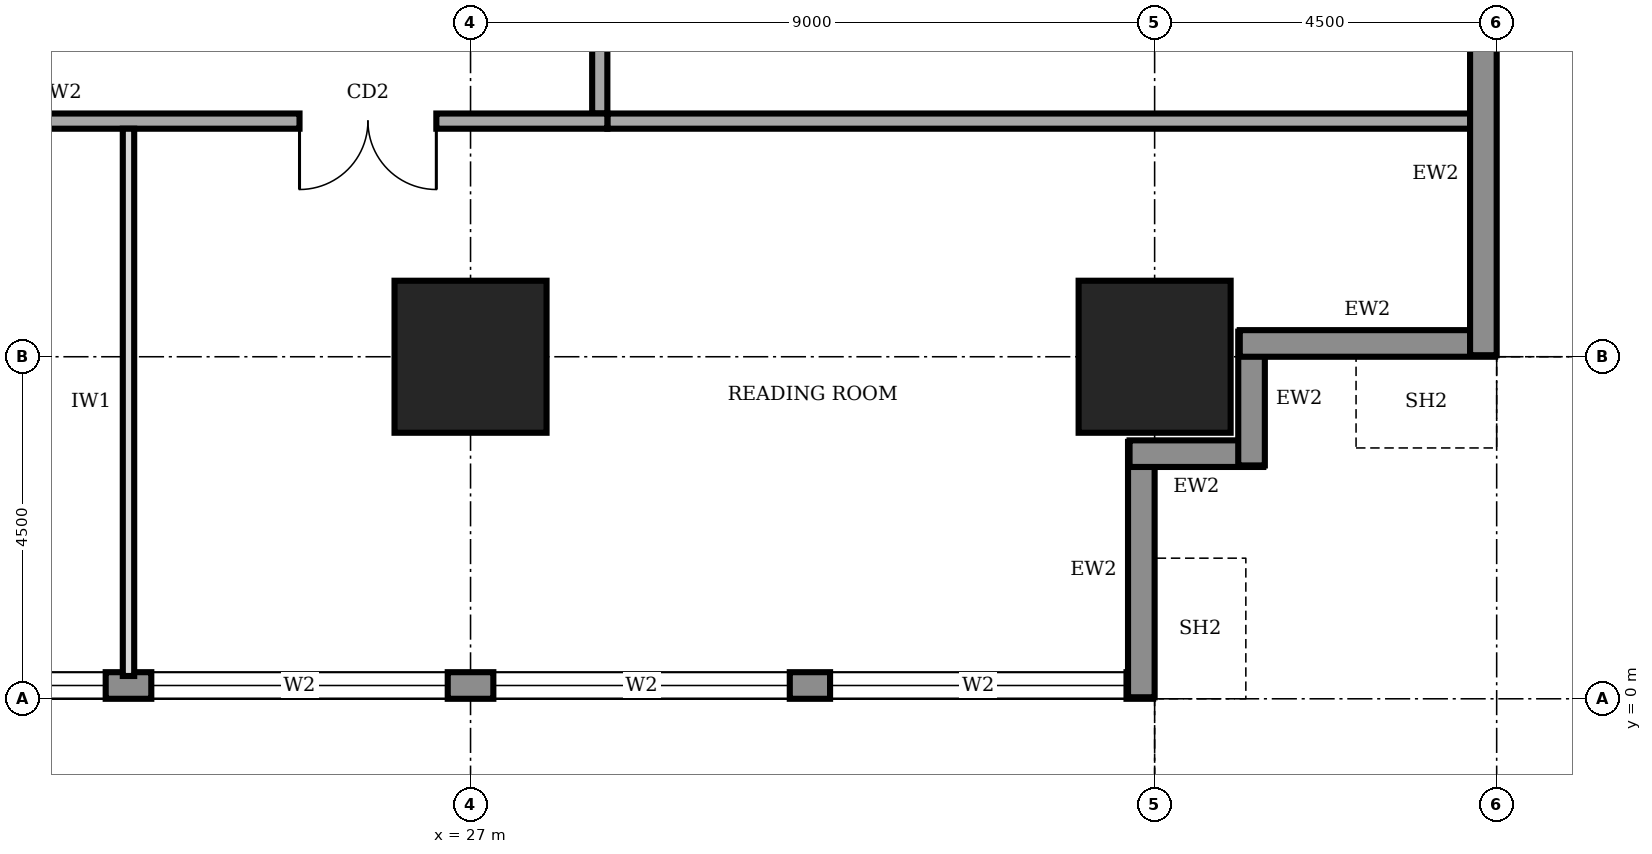
"""IFC4 building model, lengths in metres.
Left out: names, types, materials, properties, quantities, classifications, styles, units other than length and angle.
Written with IfcOpenShell. Run it as: python <this file> out.ifc"""

import sys

from ifc_helpers import new_model, si_unit, direction, frame, frame_2d, origin, origin_2d, place, context, subcontext, project, spatial, rectangle, extrude, element, fill, save


model = new_model("IFC4")
c1 = context("Model", 3, precision=1e-05, world=origin(), true_north=direction((0.0, 1.0)))
c2 = subcontext(c1, "Body", "Model", "MODEL_VIEW")
j1 = project(units=[si_unit("LENGTHUNIT", "METRE"), si_unit("PLANEANGLEUNIT", "RADIAN")], contexts=[c1])
p1 = place(None, origin())
s1 = spatial("IfcSite", under=j1, at=p1, CompositionType="ELEMENT")
p2 = place(p1, origin())
s2 = spatial("IfcBuilding", under=s1, at=p2, CompositionType="ELEMENT")
p3 = place(p2, frame((0.0, 0.0, 73.0)))
s3 = spatial("IfcBuildingStorey", under=s2, at=p3, CompositionType="ELEMENT", Elevation=73.0)
for number, where, z_axis, x_axis in (
    (1, (27.0, 4.5, 0.0), (0.0, 0.0, 1.0), (1.0, 0.0, 0.0)),
    (2, (36.0, 4.5, 0.0), (0.0, 0.0, 1.0), (1.0, 0.0, 0.0)),
):
    element("IfcColumn", number, at=place(p3, frame(where, z_axis=z_axis, x_axis=x_axis)), inside=s3, PredefinedType="COLUMN", context=c2, shape_type="SweptSolid", body=[
        extrude(rectangle(XDim=2.0, YDim=2.0, at=origin_2d()), origin(), (0.0, 0.0, 1.0), 4.0),
    ])
p4 = place(p3, frame((4.52, 0.175, 0.0), z_axis=(0.0, 0.0, 1.0), x_axis=(1.0, 0.0, 0.0)))
e3 = element("IfcWall", 3, at=p4, inside=s3, PredefinedType="STANDARD", context=c2, shape_type="SweptSolid", body=[
    extrude(rectangle(XDim=31.46, YDim=0.35, at=frame_2d((15.73, 0.0))), origin(), (0.0, 0.0, 1.0), 3.75),
])
p5 = place(p4, frame((4.78, 0.0, 0.6)))
e4 = element("IfcOpeningElement", 4, at=p5, cuts=e3, PredefinedType="OPENING", context=c2, shape_type="SweptSolid", body=[
    extrude(rectangle(XDim=3.9, YDim=2.6, at=frame_2d((1.95, 1.3))), frame((0.0, 0.185, 0.0), z_axis=(0.0, -1.0, 0.0), x_axis=(1.0, 0.0, 0.0)), (0.0, 0.0, 1.0), 0.37),
])
p6 = place(p4, frame((9.28, 0.0, 0.6)))
e5 = element("IfcOpeningElement", 5, at=p6, cuts=e3, PredefinedType="OPENING", context=c2, shape_type="SweptSolid", body=[
    extrude(rectangle(XDim=3.9, YDim=2.6, at=frame_2d((1.95, 1.3))), frame((0.0, 0.185, 0.0), z_axis=(0.0, -1.0, 0.0), x_axis=(1.0, 0.0, 0.0)), (0.0, 0.0, 1.0), 0.37),
])
p7 = place(p4, frame((13.78, 0.0, 0.6)))
e6 = element("IfcOpeningElement", 6, at=p7, cuts=e3, PredefinedType="OPENING", context=c2, shape_type="SweptSolid", body=[
    extrude(rectangle(XDim=3.9, YDim=2.6, at=frame_2d((1.95, 1.3))), frame((0.0, 0.185, 0.0), z_axis=(0.0, -1.0, 0.0), x_axis=(1.0, 0.0, 0.0)), (0.0, 0.0, 1.0), 0.37),
])
p8 = place(p4, frame((18.28, 0.0, 0.6)))
e7 = element("IfcOpeningElement", 7, at=p8, cuts=e3, PredefinedType="OPENING", context=c2, shape_type="SweptSolid", body=[
    extrude(rectangle(XDim=3.9, YDim=2.6, at=frame_2d((1.95, 1.3))), frame((0.0, 0.185, 0.0), z_axis=(0.0, -1.0, 0.0), x_axis=(1.0, 0.0, 0.0)), (0.0, 0.0, 1.0), 0.37),
])
p9 = place(p4, frame((22.78, 0.0, 0.6)))
e8 = element("IfcOpeningElement", 8, at=p9, cuts=e3, PredefinedType="OPENING", context=c2, shape_type="SweptSolid", body=[
    extrude(rectangle(XDim=3.9, YDim=2.6, at=frame_2d((1.95, 1.3))), frame((0.0, 0.185, 0.0), z_axis=(0.0, -1.0, 0.0), x_axis=(1.0, 0.0, 0.0)), (0.0, 0.0, 1.0), 0.37),
])
p10 = place(p4, frame((27.21, 0.0, 0.6)))
e9 = element("IfcOpeningElement", 9, at=p10, cuts=e3, PredefinedType="OPENING", context=c2, shape_type="SweptSolid", body=[
    extrude(rectangle(XDim=3.9, YDim=2.6, at=frame_2d((1.95, 1.3))), frame((0.0, 0.185, 0.0), z_axis=(0.0, -1.0, 0.0), x_axis=(1.0, 0.0, 0.0)), (0.0, 0.0, 1.0), 0.37),
])
p11 = place(p3, frame((35.825, 0.02, 0.0), z_axis=(0.0, 0.0, 1.0), x_axis=(0.0, 1.0, 0.0)))
e10 = element("IfcWall", 10, at=p11, inside=s3, PredefinedType="STANDARD", context=c2, shape_type="SweptSolid", body=[
    extrude(rectangle(XDim=3.36, YDim=0.35, at=frame_2d((1.68, 0.0))), origin(), (0.0, 0.0, 1.0), 2.75),
])
for number, where, z_axis, x_axis in (
    (11, (35.67, 3.225, 0.0), (0.0, 0.0, 1.0), (1.0, 0.0, 0.0)),
    (12, (37.275, 3.07, 0.0), (0.0, 0.0, 1.0), (0.0, 1.0, 0.0)),
):
    element("IfcWall", number, at=place(p3, frame(where, z_axis=z_axis, x_axis=x_axis)), inside=s3, PredefinedType="STANDARD", context=c2, shape_type="SweptSolid", body=[
        extrude(rectangle(XDim=1.76, YDim=0.35, at=frame_2d((0.88, 0.0))), origin(), (0.0, 0.0, 1.0), 3.75),
    ])
p12 = place(p3, frame((37.12, 4.675, 0.0), z_axis=(0.0, 0.0, 1.0), x_axis=(1.0, 0.0, 0.0)))
e13 = element("IfcWall", 13, at=p12, inside=s3, PredefinedType="STANDARD", context=c2, shape_type="SweptSolid", body=[
    extrude(rectangle(XDim=3.36, YDim=0.35, at=frame_2d((1.68, 0.0))), origin(), (0.0, 0.0, 1.0), 2.75),
])
p13 = place(p3, frame((40.325, 4.52, 0.0), z_axis=(0.0, 0.0, 1.0), x_axis=(0.0, 1.0, 0.0)))
e14 = element("IfcWall", 14, at=p13, inside=s3, PredefinedType="STANDARD", context=c2, shape_type="SweptSolid", body=[
    extrude(rectangle(XDim=31.46, YDim=0.35, at=frame_2d((15.73, 0.0))), origin(), (0.0, 0.0, 1.0), 3.75),
])
p14 = place(p13, frame((4.78, 0.0, 0.6)))
e15 = element("IfcOpeningElement", 15, at=p14, cuts=e14, PredefinedType="OPENING", context=c2, shape_type="SweptSolid", body=[
    extrude(rectangle(XDim=3.9, YDim=2.6, at=frame_2d((1.95, 1.3))), frame((0.0, 0.185, 0.0), z_axis=(0.0, -1.0, 0.0), x_axis=(1.0, 0.0, 0.0)), (0.0, 0.0, 1.0), 0.37),
])
p15 = place(p13, frame((9.28, 0.0, 0.6)))
e16 = element("IfcOpeningElement", 16, at=p15, cuts=e14, PredefinedType="OPENING", context=c2, shape_type="SweptSolid", body=[
    extrude(rectangle(XDim=3.9, YDim=2.6, at=frame_2d((1.95, 1.3))), frame((0.0, 0.185, 0.0), z_axis=(0.0, -1.0, 0.0), x_axis=(1.0, 0.0, 0.0)), (0.0, 0.0, 1.0), 0.37),
])
p16 = place(p13, frame((13.78, 0.0, 0.6)))
e17 = element("IfcOpeningElement", 17, at=p16, cuts=e14, PredefinedType="OPENING", context=c2, shape_type="SweptSolid", body=[
    extrude(rectangle(XDim=3.9, YDim=2.6, at=frame_2d((1.95, 1.3))), frame((0.0, 0.185, 0.0), z_axis=(0.0, -1.0, 0.0), x_axis=(1.0, 0.0, 0.0)), (0.0, 0.0, 1.0), 0.37),
])
p17 = place(p13, frame((18.28, 0.0, 0.6)))
e18 = element("IfcOpeningElement", 18, at=p17, cuts=e14, PredefinedType="OPENING", context=c2, shape_type="SweptSolid", body=[
    extrude(rectangle(XDim=3.9, YDim=2.6, at=frame_2d((1.95, 1.3))), frame((0.0, 0.185, 0.0), z_axis=(0.0, -1.0, 0.0), x_axis=(1.0, 0.0, 0.0)), (0.0, 0.0, 1.0), 0.37),
])
p18 = place(p13, frame((22.78, 0.0, 0.6)))
e19 = element("IfcOpeningElement", 19, at=p18, cuts=e14, PredefinedType="OPENING", context=c2, shape_type="SweptSolid", body=[
    extrude(rectangle(XDim=3.9, YDim=2.6, at=frame_2d((1.95, 1.3))), frame((0.0, 0.185, 0.0), z_axis=(0.0, -1.0, 0.0), x_axis=(1.0, 0.0, 0.0)), (0.0, 0.0, 1.0), 0.37),
])
p19 = place(p13, frame((27.21, 0.0, 0.6)))
e20 = element("IfcOpeningElement", 20, at=p19, cuts=e14, PredefinedType="OPENING", context=c2, shape_type="SweptSolid", body=[
    extrude(rectangle(XDim=3.9, YDim=2.6, at=frame_2d((1.95, 1.3))), frame((0.0, 0.185, 0.0), z_axis=(0.0, -1.0, 0.0), x_axis=(1.0, 0.0, 0.0)), (0.0, 0.0, 1.0), 0.37),
])
p20 = place(p3, frame((11.9, 7.6, 0.0), z_axis=(0.0, 0.0, 1.0), x_axis=(1.0, 0.0, 0.0)))
e21 = element("IfcWall", 21, at=p20, inside=s3, PredefinedType="SOLIDWALL", context=c2, shape_type="SweptSolid", body=[
    extrude(rectangle(XDim=16.9, YDim=0.2, at=frame_2d((8.45, 0.0))), origin(), (0.0, 0.0, 1.0), 3.75),
])
p21 = place(p20, frame((0.275, 0.0, 0.0)))
e22 = element("IfcOpeningElement", 22, at=p21, cuts=e21, PredefinedType="OPENING", context=c2, shape_type="SweptSolid", body=[
    extrude(rectangle(XDim=1.0, YDim=2.1, at=frame_2d((0.5, 1.05))), frame((0.0, 0.11, 0.0), z_axis=(0.0, -1.0, 0.0), x_axis=(1.0, 0.0, 0.0)), (0.0, 0.0, 1.0), 0.22),
])
p22 = place(p20, frame((5.6, 0.0, 0.0)))
e23 = element("IfcOpeningElement", 23, at=p22, cuts=e21, PredefinedType="OPENING", context=c2, shape_type="SweptSolid", body=[
    extrude(rectangle(XDim=1.0, YDim=2.1, at=frame_2d((0.5, 1.05))), frame((0.0, 0.11, 0.0), z_axis=(0.0, -1.0, 0.0), x_axis=(1.0, 0.0, 0.0)), (0.0, 0.0, 1.0), 0.22),
])
p23 = place(p20, frame((12.85, 0.0, 0.0)))
e24 = element("IfcOpeningElement", 24, at=p23, cuts=e21, PredefinedType="OPENING", context=c2, shape_type="SweptSolid", body=[
    extrude(rectangle(XDim=1.8, YDim=2.1, at=frame_2d((0.9, 1.05))), frame((0.0, 0.11, 0.0), z_axis=(0.0, -1.0, 0.0), x_axis=(1.0, 0.0, 0.0)), (0.0, 0.0, 1.0), 0.22),
])
p24 = place(p3, frame((28.7, 7.7, 0.0), z_axis=(0.0, 0.0, 1.0), x_axis=(0.0, 1.0, 0.0)))
e25 = element("IfcWall", 25, at=p24, inside=s3, PredefinedType="SOLIDWALL", context=c2, shape_type="SweptSolid", body=[
    extrude(rectangle(XDim=25.3, YDim=0.2, at=frame_2d((12.65, 0.0))), origin(), (0.0, 0.0, 1.0), 3.75),
])
p25 = place(p24, frame((4.15, 0.0, 0.0)))
e26 = element("IfcOpeningElement", 26, at=p25, cuts=e25, PredefinedType="OPENING", context=c2, shape_type="SweptSolid", body=[
    extrude(rectangle(XDim=1.8, YDim=2.1, at=frame_2d((0.9, 1.05))), frame((0.0, 0.11, 0.0), z_axis=(0.0, -1.0, 0.0), x_axis=(1.0, 0.0, 0.0)), (0.0, 0.0, 1.0), 0.22),
])
p26 = place(p24, frame((12.05, 0.0, 0.0)))
e27 = element("IfcOpeningElement", 27, at=p26, cuts=e25, PredefinedType="OPENING", context=c2, shape_type="SweptSolid", body=[
    extrude(rectangle(XDim=1.0, YDim=2.1, at=frame_2d((0.5, 1.05))), frame((0.0, 0.11, 0.0), z_axis=(0.0, -1.0, 0.0), x_axis=(1.0, 0.0, 0.0)), (0.0, 0.0, 1.0), 0.22),
])
p27 = place(p24, frame((19.15, 0.0, 0.0)))
e28 = element("IfcOpeningElement", 28, at=p27, cuts=e25, PredefinedType="OPENING", context=c2, shape_type="SweptSolid", body=[
    extrude(rectangle(XDim=1.8, YDim=2.1, at=frame_2d((0.9, 1.05))), frame((0.0, 0.11, 0.0), z_axis=(0.0, -1.0, 0.0), x_axis=(1.0, 0.0, 0.0)), (0.0, 0.0, 1.0), 0.22),
])
p28 = place(p3, frame((28.8, 7.6, 0.0), z_axis=(0.0, 0.0, 1.0), x_axis=(1.0, 0.0, 0.0)))
e29 = element("IfcWall", 29, at=p28, inside=s3, PredefinedType="SOLIDWALL", context=c2, shape_type="SweptSolid", body=[
    extrude(rectangle(XDim=11.4, YDim=0.2, at=frame_2d((5.7, 0.0))), origin(), (0.0, 0.0, 1.0), 3.75),
])
p29 = place(p3, frame((22.5, 0.3, 0.0), z_axis=(0.0, 0.0, 1.0), x_axis=(0.0, 1.0, 0.0)))
e30 = element("IfcWall", 30, at=p29, inside=s3, PredefinedType="PARTITIONING", context=c2, shape_type="SweptSolid", body=[
    extrude(rectangle(XDim=7.2, YDim=0.15, at=frame_2d((3.6, 0.0))), origin(), (0.0, 0.0, 1.0), 3.75),
])
p30 = place(p7, origin())
e31 = element("IfcWindow", 31, at=p30, inside=s3, PartitioningType="SINGLE_PANEL", PredefinedType="WINDOW", context=c2, shape_type="SweptSolid", body=[
    extrude(rectangle(XDim=3.9, YDim=2.6, at=frame_2d((1.95, 1.3))), frame((0.0, 0.03, 0.0), z_axis=(0.0, -1.0, 0.0), x_axis=(1.0, 0.0, 0.0)), (0.0, 0.0, 1.0), 0.06),
])
fill(e6, e31)
p31 = place(p8, origin())
e32 = element("IfcWindow", 32, at=p31, inside=s3, PartitioningType="SINGLE_PANEL", PredefinedType="WINDOW", context=c2, shape_type="SweptSolid", body=[
    extrude(rectangle(XDim=3.9, YDim=2.6, at=frame_2d((1.95, 1.3))), frame((0.0, 0.03, 0.0), z_axis=(0.0, -1.0, 0.0), x_axis=(1.0, 0.0, 0.0)), (0.0, 0.0, 1.0), 0.06),
])
fill(e7, e32)
p32 = place(p9, origin())
e33 = element("IfcWindow", 33, at=p32, inside=s3, PartitioningType="SINGLE_PANEL", PredefinedType="WINDOW", context=c2, shape_type="SweptSolid", body=[
    extrude(rectangle(XDim=3.9, YDim=2.6, at=frame_2d((1.95, 1.3))), frame((0.0, 0.03, 0.0), z_axis=(0.0, -1.0, 0.0), x_axis=(1.0, 0.0, 0.0)), (0.0, 0.0, 1.0), 0.06),
])
fill(e8, e33)
p33 = place(p10, origin())
e34 = element("IfcWindow", 34, at=p33, inside=s3, PartitioningType="SINGLE_PANEL", PredefinedType="WINDOW", context=c2, shape_type="SweptSolid", body=[
    extrude(rectangle(XDim=3.9, YDim=2.6, at=frame_2d((1.95, 1.3))), frame((0.0, 0.03, 0.0), z_axis=(0.0, -1.0, 0.0), x_axis=(1.0, 0.0, 0.0)), (0.0, 0.0, 1.0), 0.06),
])
fill(e9, e34)
p34 = place(p23, frame((1.8, 0.0, 0.0), z_axis=(0.0, 0.0, 1.0), x_axis=(-1.0, 0.0, 0.0)))
e35 = element("IfcDoor", 35, at=p34, inside=s3, OperationType="DOUBLE_DOOR_SINGLE_SWING", PredefinedType="DOOR", context=c2, shape_type="SweptSolid", body=[
    extrude(rectangle(XDim=1.8, YDim=2.1, at=frame_2d((0.9, 1.05))), frame((0.0, 0.025, 0.0), z_axis=(0.0, -1.0, 0.0), x_axis=(1.0, 0.0, 0.0)), (0.0, 0.0, 1.0), 0.05),
])
fill(e24, e35)
save(model, sys.argv[1])
